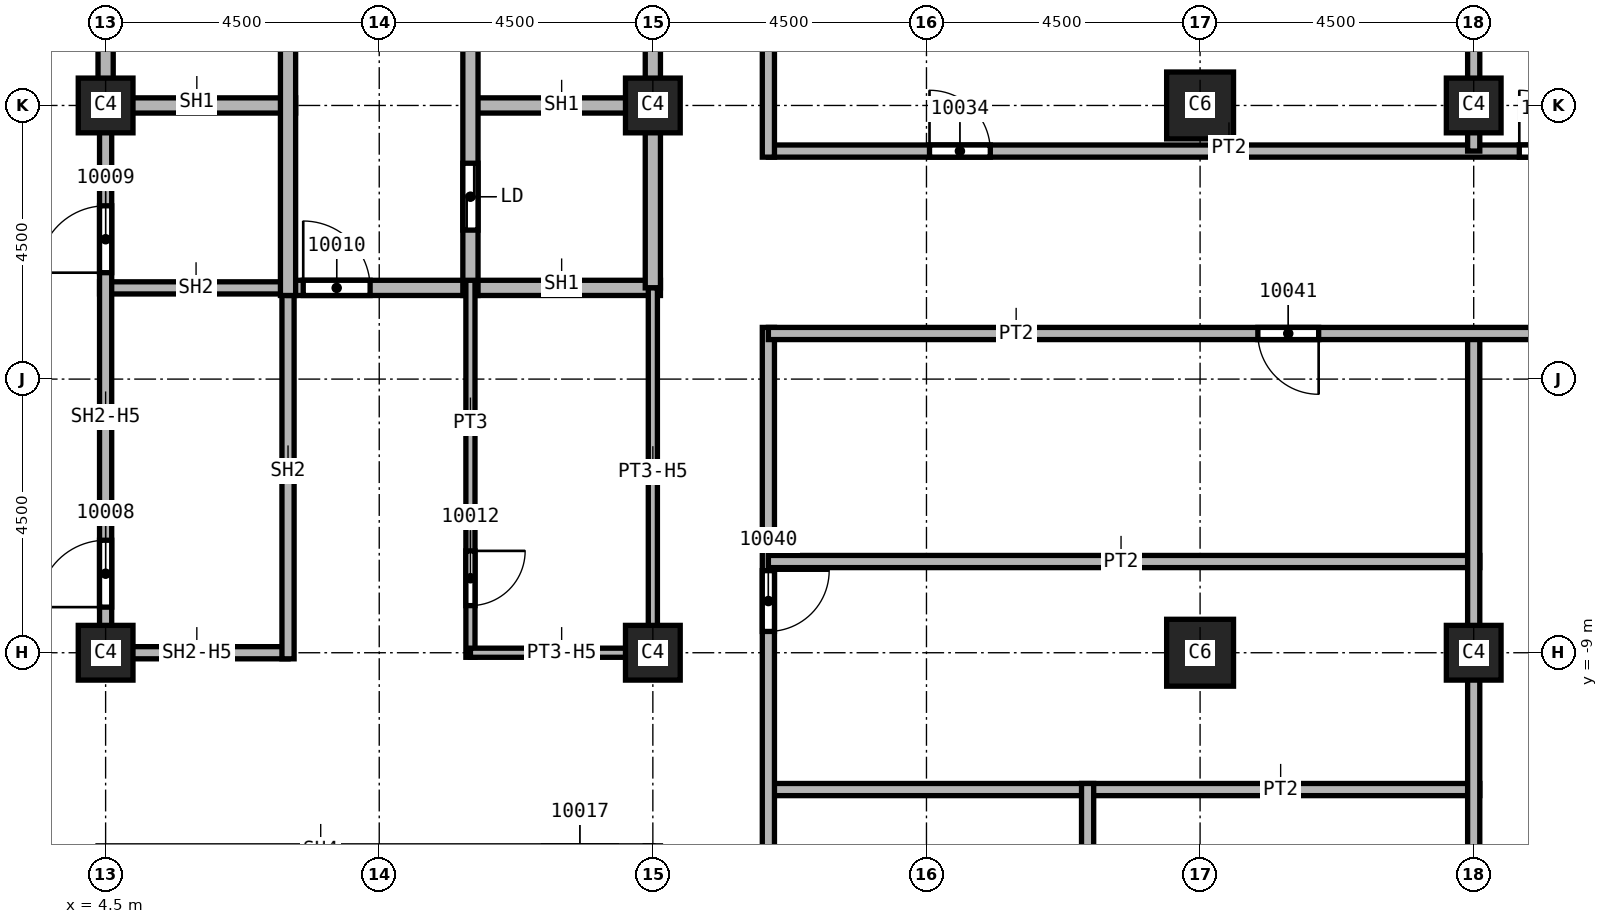
"""IFC4 building model, lengths in metres.
Left out: names, types, materials, properties, quantities, classifications, styles, units other than length and angle.
Written with IfcOpenShell. Run it as: python <this file> out.ifc"""

import sys

from ifc_helpers import new_model, si_unit, direction, frame, frame_2d, origin, origin_2d, place, context, subcontext, project, spatial, rectangle, extrude, element, fill, save


model = new_model("IFC4")
c1 = context("Model", 3, precision=1e-05, world=origin(), true_north=direction((0.0, 1.0)))
c2 = subcontext(c1, "Body", "Model", "MODEL_VIEW")
j1 = project(units=[si_unit("LENGTHUNIT", "METRE"), si_unit("PLANEANGLEUNIT", "RADIAN")], contexts=[c1])
p1 = place(None, origin())
s1 = spatial("IfcSite", under=j1, at=p1, CompositionType="ELEMENT")
p2 = place(p1, origin())
s2 = spatial("IfcBuilding", under=s1, at=p2, CompositionType="ELEMENT")
p3 = place(p2, frame((0.0, 0.0, 170.0)))
s3 = spatial("IfcBuildingStorey", under=s2, at=p3, CompositionType="ELEMENT", Elevation=170.0)
for number, where, z_axis, x_axis in (
    (1, (22.5, 0.0, 0.0), (0.0, 0.0, 1.0), (1.0, 0.0, 0.0)),
    (2, (22.5, -9.0, 0.0), (0.0, 0.0, 1.0), (1.0, 0.0, 0.0)),
):
    element("IfcColumn", number, at=place(p3, frame(where, z_axis=z_axis, x_axis=x_axis)), inside=s3, PredefinedType="COLUMN", context=c2, shape_type="SweptSolid", body=[
        extrude(rectangle(XDim=1.1, YDim=1.1, at=origin_2d()), origin(), (0.0, 0.0, 1.0), 3.7),
    ])
for number, where, z_axis, x_axis in (
    (3, (4.5, 0.0, 0.0), (0.0, 0.0, 1.0), (1.0, 0.0, 0.0)),
    (4, (4.5, -9.0, 0.0), (0.0, 0.0, 1.0), (1.0, 0.0, 0.0)),
    (5, (13.5, 0.0, 0.0), (0.0, 0.0, 1.0), (1.0, 0.0, 0.0)),
    (6, (13.5, -9.0, 0.0), (0.0, 0.0, 1.0), (1.0, 0.0, 0.0)),
    (7, (27.0, 0.0, 0.0), (0.0, 0.0, 1.0), (1.0, 0.0, 0.0)),
    (8, (27.0, -9.0, 0.0), (0.0, 0.0, 1.0), (1.0, 0.0, 0.0)),
):
    element("IfcColumn", number, at=place(p3, frame(where, z_axis=z_axis, x_axis=x_axis)), inside=s3, PredefinedType="COLUMN", context=c2, shape_type="SweptSolid", body=[
        extrude(rectangle(XDim=0.9, YDim=0.9, at=origin_2d()), origin(), (0.0, 0.0, 1.0), 3.7),
    ])
p4 = place(p3, frame((15.4, -11.25, 0.0), z_axis=(0.0, 0.0, 1.0), x_axis=(1.0, 0.0, 0.0)))
e9 = element("IfcWall", 9, at=p4, inside=s3, PredefinedType="PARTITIONING", context=c2, shape_type="SweptSolid", body=[
    extrude(rectangle(XDim=11.7, YDim=0.2, at=frame_2d((5.85, 0.0))), origin(), (0.0, 0.0, 1.0), 3.7),
])
p5 = place(p3, frame((15.4, -3.65, 0.0), z_axis=(0.0, 0.0, 1.0), x_axis=(0.0, -1.0, 0.0)))
e10 = element("IfcWall", 10, at=p5, inside=s3, PredefinedType="PARTITIONING", context=c2, shape_type="SweptSolid", body=[
    extrude(rectangle(XDim=19.6, YDim=0.2, at=frame_2d((9.8, 0.0))), origin(), (0.0, 0.0, 1.0), 3.7),
])
p6 = place(p5, frame((13.0, 0.0, 0.0)))
e11 = element("IfcOpeningElement", 11, at=p6, cuts=e10, PredefinedType="OPENING", context=c2, shape_type="SweptSolid", body=[
    extrude(rectangle(XDim=1.0, YDim=2.1, at=frame_2d((0.5, 1.05))), frame((0.0, 0.1, 0.0), z_axis=(0.0, -1.0, 0.0), x_axis=(1.0, 0.0, 0.0)), (0.0, 0.0, 1.0), 0.2),
])
p7 = place(p5, frame((4.0, 0.0, 0.0)))
e12 = element("IfcOpeningElement", 12, at=p7, cuts=e10, PredefinedType="OPENING", context=c2, shape_type="SweptSolid", body=[
    extrude(rectangle(XDim=1.0, YDim=2.1, at=frame_2d((0.5, 1.05))), frame((0.0, 0.1, 0.0), z_axis=(0.0, -1.0, 0.0), x_axis=(1.0, 0.0, 0.0)), (0.0, 0.0, 1.0), 0.2),
])
p8 = place(p3, frame((15.4, -7.5, 0.0), z_axis=(0.0, 0.0, 1.0), x_axis=(1.0, 0.0, 0.0)))
e13 = element("IfcWall", 13, at=p8, inside=s3, PredefinedType="PARTITIONING", context=c2, shape_type="SweptSolid", body=[
    extrude(rectangle(XDim=11.7, YDim=0.2, at=frame_2d((5.85, 0.0))), origin(), (0.0, 0.0, 1.0), 3.7),
])
p9 = place(p3, frame((15.4, -0.75, 0.0), z_axis=(0.0, 0.0, 1.0), x_axis=(1.0, 0.0, 0.0)))
e14 = element("IfcWall", 14, at=p9, inside=s3, PredefinedType="PARTITIONING", context=c2, shape_type="SweptSolid", body=[
    extrude(rectangle(XDim=18.45, YDim=0.2, at=frame_2d((9.225, 0.0))), origin(), (0.0, 0.0, 1.0), 3.7),
])
p10 = place(p9, frame((2.65, 0.0, 0.0)))
e15 = element("IfcOpeningElement", 15, at=p10, cuts=e14, PredefinedType="OPENING", context=c2, shape_type="SweptSolid", body=[
    extrude(rectangle(XDim=1.0, YDim=2.1, at=frame_2d((0.5, 1.05))), frame((0.0, 0.1, 0.0), z_axis=(0.0, -1.0, 0.0), x_axis=(1.0, 0.0, 0.0)), (0.0, 0.0, 1.0), 0.2),
])
p11 = place(p9, frame((12.35, 0.0, 0.0)))
e16 = element("IfcOpeningElement", 16, at=p11, cuts=e14, PredefinedType="OPENING", context=c2, shape_type="SweptSolid", body=[
    extrude(rectangle(XDim=1.0, YDim=2.1, at=frame_2d((0.5, 1.05))), frame((0.0, 0.1, 0.0), z_axis=(0.0, -1.0, 0.0), x_axis=(1.0, 0.0, 0.0)), (0.0, 0.0, 1.0), 0.2),
])
p12 = place(p3, frame((15.4, 23.25, 0.0), z_axis=(0.0, 0.0, 1.0), x_axis=(0.0, -1.0, 0.0)))
e17 = element("IfcWall", 17, at=p12, inside=s3, PredefinedType="PARTITIONING", context=c2, shape_type="SweptSolid", body=[
    extrude(rectangle(XDim=24.1, YDim=0.2, at=frame_2d((12.05, 0.0))), origin(), (0.0, 0.0, 1.0), 3.7),
])
p13 = place(p12, frame((13.05, 0.0, 0.0)))
e18 = element("IfcOpeningElement", 18, at=p13, cuts=e17, PredefinedType="OPENING", context=c2, shape_type="SweptSolid", body=[
    extrude(rectangle(XDim=1.0, YDim=2.1, at=frame_2d((0.5, 1.05))), frame((0.0, 0.1, 0.0), z_axis=(0.0, -1.0, 0.0), x_axis=(1.0, 0.0, 0.0)), (0.0, 0.0, 1.0), 0.2),
])
p14 = place(p12, frame((3.1, 0.0, 0.0)))
e19 = element("IfcOpeningElement", 19, at=p14, cuts=e17, PredefinedType="OPENING", context=c2, shape_type="SweptSolid", body=[
    extrude(rectangle(XDim=1.0, YDim=2.1, at=frame_2d((0.5, 1.05))), frame((0.0, 0.1, 0.0), z_axis=(0.0, -1.0, 0.0), x_axis=(1.0, 0.0, 0.0)), (0.0, 0.0, 1.0), 0.2),
])
p15 = place(p3, frame((20.65, -11.15, 0.0), z_axis=(0.0, 0.0, 1.0), x_axis=(0.0, -1.0, 0.0)))
e20 = element("IfcWall", 20, at=p15, inside=s3, PredefinedType="PARTITIONING", context=c2, shape_type="SweptSolid", body=[
    extrude(rectangle(XDim=12.1, YDim=0.2, at=frame_2d((6.05, 0.0))), origin(), (0.0, 0.0, 1.0), 3.7),
])
p16 = place(p15, frame((4.6, 0.0, 0.0)))
e21 = element("IfcOpeningElement", 21, at=p16, cuts=e20, PredefinedType="OPENING", context=c2, shape_type="SweptSolid", body=[
    extrude(rectangle(XDim=1.0, YDim=2.1, at=frame_2d((0.5, 1.05))), frame((0.0, 0.1, 0.0), z_axis=(0.0, -1.0, 0.0), x_axis=(1.0, 0.0, 0.0)), (0.0, 0.0, 1.0), 0.2),
])
p17 = place(p3, frame((27.0, -3.75, 0.0), z_axis=(0.0, 0.0, 1.0), x_axis=(0.0, -1.0, 0.0)))
e22 = element("IfcWall", 22, at=p17, inside=s3, PredefinedType="PARTITIONING", context=c2, shape_type="SweptSolid", body=[
    extrude(rectangle(XDim=13.7, YDim=0.2, at=frame_2d((6.85, 0.0))), origin(), (0.0, 0.0, 1.0), 3.7),
])
p18 = place(p3, frame((27.0, 17.45, 0.0), z_axis=(0.0, 0.0, 1.0), x_axis=(0.0, -1.0, 0.0)))
e23 = element("IfcWall", 23, at=p18, inside=s3, PredefinedType="PARTITIONING", context=c2, shape_type="SweptSolid", body=[
    extrude(rectangle(XDim=18.2, YDim=0.2, at=frame_2d((9.1, 0.0))), origin(), (0.0, 0.0, 1.0), 3.7),
])
p19 = place(p3, frame((33.85, -3.75, 0.0), z_axis=(0.0, 0.0, 1.0), x_axis=(-1.0, 0.0, 0.0)))
e24 = element("IfcWall", 24, at=p19, inside=s3, PredefinedType="PARTITIONING", context=c2, shape_type="SweptSolid", body=[
    extrude(rectangle(XDim=18.45, YDim=0.2, at=frame_2d((9.225, 0.0))), origin(), (0.0, 0.0, 1.0), 3.7),
])
p20 = place(p19, frame((9.4, 0.0, 0.0)))
e25 = element("IfcOpeningElement", 25, at=p20, cuts=e24, PredefinedType="OPENING", context=c2, shape_type="SweptSolid", body=[
    extrude(rectangle(XDim=1.0, YDim=2.1, at=frame_2d((0.5, 1.05))), frame((0.0, 0.1, 0.0), z_axis=(0.0, -1.0, 0.0), x_axis=(1.0, 0.0, 0.0)), (0.0, 0.0, 1.0), 0.2),
])
p21 = place(p19, frame((2.5, 0.0, 0.0)))
e26 = element("IfcOpeningElement", 26, at=p21, cuts=e24, PredefinedType="OPENING", context=c2, shape_type="SweptSolid", body=[
    extrude(rectangle(XDim=1.0, YDim=2.1, at=frame_2d((0.5, 1.05))), frame((0.0, 0.1, 0.0), z_axis=(0.0, -1.0, 0.0), x_axis=(1.0, 0.0, 0.0)), (0.0, 0.0, 1.0), 0.2),
])
p22 = place(p3, frame((4.4, -3.0, 0.0), z_axis=(0.0, 0.0, 1.0), x_axis=(1.0, 0.0, 0.0)))
e27 = element("IfcWall", 27, at=p22, inside=s3, PredefinedType="SOLIDWALL", context=c2, shape_type="SweptSolid", body=[
    extrude(rectangle(XDim=3.225, YDim=0.2, at=frame_2d((1.613, 0.0))), origin(), (0.0, 0.0, 1.0), 3.7),
])
p23 = place(p3, frame((4.5, -9.1, 0.0), z_axis=(0.0, 0.0, 1.0), x_axis=(0.0, 1.0, 0.0)))
e28 = element("IfcWall", 28, at=p23, inside=s3, PredefinedType="SOLIDWALL", context=c2, shape_type="SweptSolid", body=[
    extrude(rectangle(XDim=9.1, YDim=0.2, at=frame_2d((4.55, 0.0))), origin(), (0.0, 0.0, 1.0), 2.938),
])
p24 = place(p23, frame((0.85, 0.0, 0.0)))
e29 = element("IfcOpeningElement", 29, at=p24, cuts=e28, PredefinedType="OPENING", context=c2, shape_type="SweptSolid", body=[
    extrude(rectangle(XDim=1.1, YDim=2.1, at=frame_2d((0.55, 1.05))), frame((0.0, 0.1, 0.0), z_axis=(0.0, -1.0, 0.0), x_axis=(1.0, 0.0, 0.0)), (0.0, 0.0, 1.0), 0.2),
])
p25 = place(p23, frame((6.35, 0.0, 0.0)))
e30 = element("IfcOpeningElement", 30, at=p25, cuts=e28, PredefinedType="OPENING", context=c2, shape_type="SweptSolid", body=[
    extrude(rectangle(XDim=1.1, YDim=2.1, at=frame_2d((0.55, 1.05))), frame((0.0, 0.1, 0.0), z_axis=(0.0, -1.0, 0.0), x_axis=(1.0, 0.0, 0.0)), (0.0, 0.0, 1.0), 0.2),
])
p26 = place(p3, frame((7.5, -9.0, 0.0), z_axis=(0.0, 0.0, 1.0), x_axis=(-1.0, 0.0, 0.0)))
e31 = element("IfcWall", 31, at=p26, inside=s3, PredefinedType="SOLIDWALL", context=c2, shape_type="SweptSolid", body=[
    extrude(rectangle(XDim=3.0, YDim=0.2, at=frame_2d((1.5, 0.0))), origin(), (0.0, 0.0, 1.0), 2.938),
])
p27 = place(p3, frame((7.5, -2.875, 0.0), z_axis=(0.0, 0.0, 1.0), x_axis=(0.0, -1.0, 0.0)))
e32 = element("IfcWall", 32, at=p27, inside=s3, PredefinedType="SOLIDWALL", context=c2, shape_type="SweptSolid", body=[
    extrude(rectangle(XDim=6.225, YDim=0.2, at=frame_2d((3.113, 0.0))), origin(), (0.0, 0.0, 1.0), 3.7),
])
p28 = place(p3, frame((4.375, 0.0, 0.0), z_axis=(0.0, 0.0, 1.0), x_axis=(1.0, 0.0, 0.0)))
e33 = element("IfcWall", 33, at=p28, inside=s3, PredefinedType="SOLIDWALL", context=c2, shape_type="SweptSolid", body=[
    extrude(rectangle(XDim=3.25, YDim=0.25, at=frame_2d((1.625, 0.0))), origin(), (0.0, 0.0, 1.0), 3.7),
])
p29 = place(p3, frame((4.5, 0.0, 0.0), z_axis=(0.0, 0.0, 1.0), x_axis=(0.0, 1.0, 0.0)))
e34 = element("IfcWall", 34, at=p29, inside=s3, PredefinedType="SOLIDWALL", context=c2, shape_type="SweptSolid", body=[
    extrude(rectangle(XDim=9.125, YDim=0.25, at=frame_2d((4.562, 0.0))), origin(), (0.0, 0.0, 1.0), 2.938),
])
p30 = place(p29, frame((0.95, 0.0, 0.0)))
e35 = element("IfcOpeningElement", 35, at=p30, cuts=e34, PredefinedType="OPENING", context=c2, shape_type="SweptSolid", body=[
    extrude(rectangle(XDim=1.1, YDim=2.1, at=frame_2d((0.55, 1.05))), frame((0.0, 0.125, 0.0), z_axis=(0.0, -1.0, 0.0), x_axis=(1.0, 0.0, 0.0)), (0.0, 0.0, 1.0), 0.25),
])
p31 = place(p29, frame((3.95, 0.0, 0.0)))
e36 = element("IfcOpeningElement", 36, at=p31, cuts=e34, PredefinedType="OPENING", context=c2, shape_type="SweptSolid", body=[
    extrude(rectangle(XDim=1.1, YDim=2.1, at=frame_2d((0.55, 1.05))), frame((0.0, 0.125, 0.0), z_axis=(0.0, -1.0, 0.0), x_axis=(1.0, 0.0, 0.0)), (0.0, 0.0, 1.0), 0.25),
])
p32 = place(p29, frame((7.012, 0.0, 0.0)))
e37 = element("IfcOpeningElement", 37, at=p32, cuts=e34, PredefinedType="OPENING", context=c2, shape_type="SweptSolid", body=[
    extrude(rectangle(XDim=1.1, YDim=2.1, at=frame_2d((0.55, 1.05))), frame((0.0, 0.125, 0.0), z_axis=(0.0, -1.0, 0.0), x_axis=(1.0, 0.0, 0.0)), (0.0, 0.0, 1.0), 0.25),
])
p33 = place(p3, frame((7.5, -3.0, 0.0), z_axis=(0.0, 0.0, 1.0), x_axis=(1.0, 0.0, 0.0)))
e38 = element("IfcWall", 38, at=p33, inside=s3, PredefinedType="SOLIDWALL", context=c2, shape_type="SweptSolid", body=[
    extrude(rectangle(XDim=6.125, YDim=0.25, at=frame_2d((3.062, 0.0))), origin(), (0.0, 0.0, 1.0), 3.7),
])
p34 = place(p33, frame((0.25, 0.0, 0.0)))
e39 = element("IfcOpeningElement", 39, at=p34, cuts=e38, PredefinedType="OPENING", context=c2, shape_type="SweptSolid", body=[
    extrude(rectangle(XDim=1.1, YDim=2.1, at=frame_2d((0.55, 1.05))), frame((0.0, 0.125, 0.0), z_axis=(0.0, -1.0, 0.0), x_axis=(1.0, 0.0, 0.0)), (0.0, 0.0, 1.0), 0.25),
])
p35 = place(p3, frame((7.5, 9.125, 0.0), z_axis=(0.0, 0.0, 1.0), x_axis=(0.0, -1.0, 0.0)))
e40 = element("IfcWall", 40, at=p35, inside=s3, PredefinedType="SOLIDWALL", context=c2, shape_type="SweptSolid", body=[
    extrude(rectangle(XDim=12.25, YDim=0.25, at=frame_2d((6.125, 0.0))), origin(), (0.0, 0.0, 1.0), 3.7),
])
p36 = place(p3, frame((10.5, 0.0, 0.0), z_axis=(0.0, 0.0, 1.0), x_axis=(1.0, 0.0, 0.0)))
e41 = element("IfcWall", 41, at=p36, inside=s3, PredefinedType="SOLIDWALL", context=c2, shape_type="SweptSolid", body=[
    extrude(rectangle(XDim=3.125, YDim=0.25, at=frame_2d((1.562, 0.0))), origin(), (0.0, 0.0, 1.0), 3.7),
])
p37 = place(p3, frame((10.5, 6.125, 0.0), z_axis=(0.0, 0.0, 1.0), x_axis=(0.0, -1.0, 0.0)))
e42 = element("IfcWall", 42, at=p37, inside=s3, PredefinedType="SOLIDWALL", context=c2, shape_type="SweptSolid", body=[
    extrude(rectangle(XDim=9.25, YDim=0.25, at=frame_2d((4.625, 0.0))), origin(), (0.0, 0.0, 1.0), 3.7),
])
p38 = place(p37, frame((7.075, 0.0, 0.0)))
e43 = element("IfcOpeningElement", 43, at=p38, cuts=e42, PredefinedType="OPENING", context=c2, shape_type="SweptSolid", body=[
    extrude(rectangle(XDim=1.1, YDim=2.1, at=frame_2d((0.55, 1.05))), frame((0.0, 0.125, 0.0), z_axis=(0.0, -1.0, 0.0), x_axis=(1.0, 0.0, 0.0)), (0.0, 0.0, 1.0), 0.25),
])
p39 = place(p37, frame((4.075, 0.0, 0.0)))
e44 = element("IfcOpeningElement", 44, at=p39, cuts=e42, PredefinedType="OPENING", context=c2, shape_type="SweptSolid", body=[
    extrude(rectangle(XDim=1.1, YDim=2.1, at=frame_2d((0.55, 1.05))), frame((0.0, 0.125, 0.0), z_axis=(0.0, -1.0, 0.0), x_axis=(1.0, 0.0, 0.0)), (0.0, 0.0, 1.0), 0.25),
])
p40 = place(p3, frame((13.5, 6.0, 0.0), z_axis=(0.0, 0.0, 1.0), x_axis=(0.0, -1.0, 0.0)))
e45 = element("IfcWall", 45, at=p40, inside=s3, PredefinedType="SOLIDWALL", context=c2, shape_type="SweptSolid", body=[
    extrude(rectangle(XDim=9.0, YDim=0.25, at=frame_2d((4.5, 0.0))), origin(), (0.0, 0.0, 1.0), 2.938),
])
p41 = place(p3, frame((10.5, -2.875, 0.0), z_axis=(0.0, 0.0, 1.0), x_axis=(0.0, -1.0, 0.0)))
e46 = element("IfcWall", 46, at=p41, inside=s3, PredefinedType="PARTITIONING", context=c2, shape_type="SweptSolid", body=[
    extrude(rectangle(XDim=6.2, YDim=0.15, at=frame_2d((3.1, 0.0))), origin(), (0.0, 0.0, 1.0), 3.7),
])
p42 = place(p41, frame((4.45, 0.0, 0.0)))
e47 = element("IfcOpeningElement", 47, at=p42, cuts=e46, PredefinedType="OPENING", context=c2, shape_type="SweptSolid", body=[
    extrude(rectangle(XDim=0.9, YDim=2.1, at=frame_2d((0.45, 1.05))), frame((0.0, 0.075, 0.0), z_axis=(0.0, -1.0, 0.0), x_axis=(1.0, 0.0, 0.0)), (0.0, 0.0, 1.0), 0.15),
])
p43 = place(p3, frame((13.5, -9.0, 0.0), z_axis=(0.0, 0.0, 1.0), x_axis=(-1.0, 0.0, 0.0)))
e48 = element("IfcWall", 48, at=p43, inside=s3, PredefinedType="PARTITIONING", context=c2, shape_type="SweptSolid", body=[
    extrude(rectangle(XDim=3.0, YDim=0.15, at=frame_2d((1.5, 0.0))), origin(), (0.0, 0.0, 1.0), 2.938),
])
p44 = place(p3, frame((13.5, -3.0, 0.0), z_axis=(0.0, 0.0, 1.0), x_axis=(0.0, -1.0, 0.0)))
e49 = element("IfcWall", 49, at=p44, inside=s3, PredefinedType="PARTITIONING", context=c2, shape_type="SweptSolid", body=[
    extrude(rectangle(XDim=6.075, YDim=0.15, at=frame_2d((3.038, 0.0))), origin(), (0.0, 0.0, 1.0), 2.938),
])
p45 = place(p24, origin())
e50 = element("IfcDoor", 50, at=p45, inside=s3, OperationType="SINGLE_SWING_LEFT", PredefinedType="DOOR", context=c2, shape_type="SweptSolid", body=[
    extrude(rectangle(XDim=1.1, YDim=2.1, at=frame_2d((0.55, 1.05))), frame((0.0, 0.025, 0.0), z_axis=(0.0, -1.0, 0.0), x_axis=(1.0, 0.0, 0.0)), (0.0, 0.0, 1.0), 0.05),
])
fill(e29, e50)
p46 = place(p25, origin())
e51 = element("IfcDoor", 51, at=p46, inside=s3, OperationType="SINGLE_SWING_RIGHT", PredefinedType="DOOR", context=c2, shape_type="SweptSolid", body=[
    extrude(rectangle(XDim=1.1, YDim=2.1, at=frame_2d((0.55, 1.05))), frame((0.0, 0.025, 0.0), z_axis=(0.0, -1.0, 0.0), x_axis=(1.0, 0.0, 0.0)), (0.0, 0.0, 1.0), 0.05),
])
fill(e30, e51)
p47 = place(p34, origin())
e52 = element("IfcDoor", 52, at=p47, inside=s3, OperationType="SINGLE_SWING_LEFT", PredefinedType="DOOR", context=c2, shape_type="SweptSolid", body=[
    extrude(rectangle(XDim=1.1, YDim=2.1, at=frame_2d((0.55, 1.05))), frame((0.0, 0.025, 0.0), z_axis=(0.0, -1.0, 0.0), x_axis=(1.0, 0.0, 0.0)), (0.0, 0.0, 1.0), 0.05),
])
fill(e39, e52)
p48 = place(p42, origin())
e53 = element("IfcDoor", 53, at=p48, inside=s3, OperationType="SINGLE_SWING_LEFT", PredefinedType="DOOR", context=c2, shape_type="SweptSolid", body=[
    extrude(rectangle(XDim=0.9, YDim=2.1, at=frame_2d((0.45, 1.05))), frame((0.0, 0.025, 0.0), z_axis=(0.0, -1.0, 0.0), x_axis=(1.0, 0.0, 0.0)), (0.0, 0.0, 1.0), 0.05),
])
fill(e47, e53)
p49 = place(p10, origin())
e54 = element("IfcDoor", 54, at=p49, inside=s3, OperationType="SINGLE_SWING_LEFT", PredefinedType="DOOR", context=c2, shape_type="SweptSolid", body=[
    extrude(rectangle(XDim=1.0, YDim=2.1, at=frame_2d((0.5, 1.05))), frame((0.0, 0.025, 0.0), z_axis=(0.0, -1.0, 0.0), x_axis=(1.0, 0.0, 0.0)), (0.0, 0.0, 1.0), 0.05),
])
fill(e15, e54)
p50 = place(p7, origin())
e55 = element("IfcDoor", 55, at=p50, inside=s3, OperationType="SINGLE_SWING_LEFT", PredefinedType="DOOR", context=c2, shape_type="SweptSolid", body=[
    extrude(rectangle(XDim=1.0, YDim=2.1, at=frame_2d((0.5, 1.05))), frame((0.0, 0.025, 0.0), z_axis=(0.0, -1.0, 0.0), x_axis=(1.0, 0.0, 0.0)), (0.0, 0.0, 1.0), 0.05),
])
fill(e12, e55)
p51 = place(p20, origin())
e56 = element("IfcDoor", 56, at=p51, inside=s3, OperationType="SINGLE_SWING_RIGHT", PredefinedType="DOOR", context=c2, shape_type="SweptSolid", body=[
    extrude(rectangle(XDim=1.0, YDim=2.1, at=frame_2d((0.5, 1.05))), frame((0.0, 0.025, 0.0), z_axis=(0.0, -1.0, 0.0), x_axis=(1.0, 0.0, 0.0)), (0.0, 0.0, 1.0), 0.05),
])
fill(e25, e56)
p52 = place(p11, origin())
e57 = element("IfcDoor", 57, at=p52, inside=s3, OperationType="SINGLE_SWING_RIGHT", PredefinedType="DOOR", context=c2, shape_type="SweptSolid", body=[
    extrude(rectangle(XDim=1.0, YDim=2.1, at=frame_2d((0.5, 1.05))), frame((0.0, 0.025, 0.0), z_axis=(0.0, -1.0, 0.0), x_axis=(1.0, 0.0, 0.0)), (0.0, 0.0, 1.0), 0.05),
])
fill(e16, e57)
p53 = place(p38, origin())
e58 = element("IfcDoor", 58, at=p53, inside=s3, OperationType="SLIDING_TO_LEFT", PredefinedType="DOOR", context=c2, shape_type="SweptSolid", body=[
    extrude(rectangle(XDim=1.1, YDim=2.1, at=frame_2d((0.55, 1.05))), frame((0.0, 0.025, 0.0), z_axis=(0.0, -1.0, 0.0), x_axis=(1.0, 0.0, 0.0)), (0.0, 0.0, 1.0), 0.05),
])
fill(e43, e58)
save(model, sys.argv[1])
